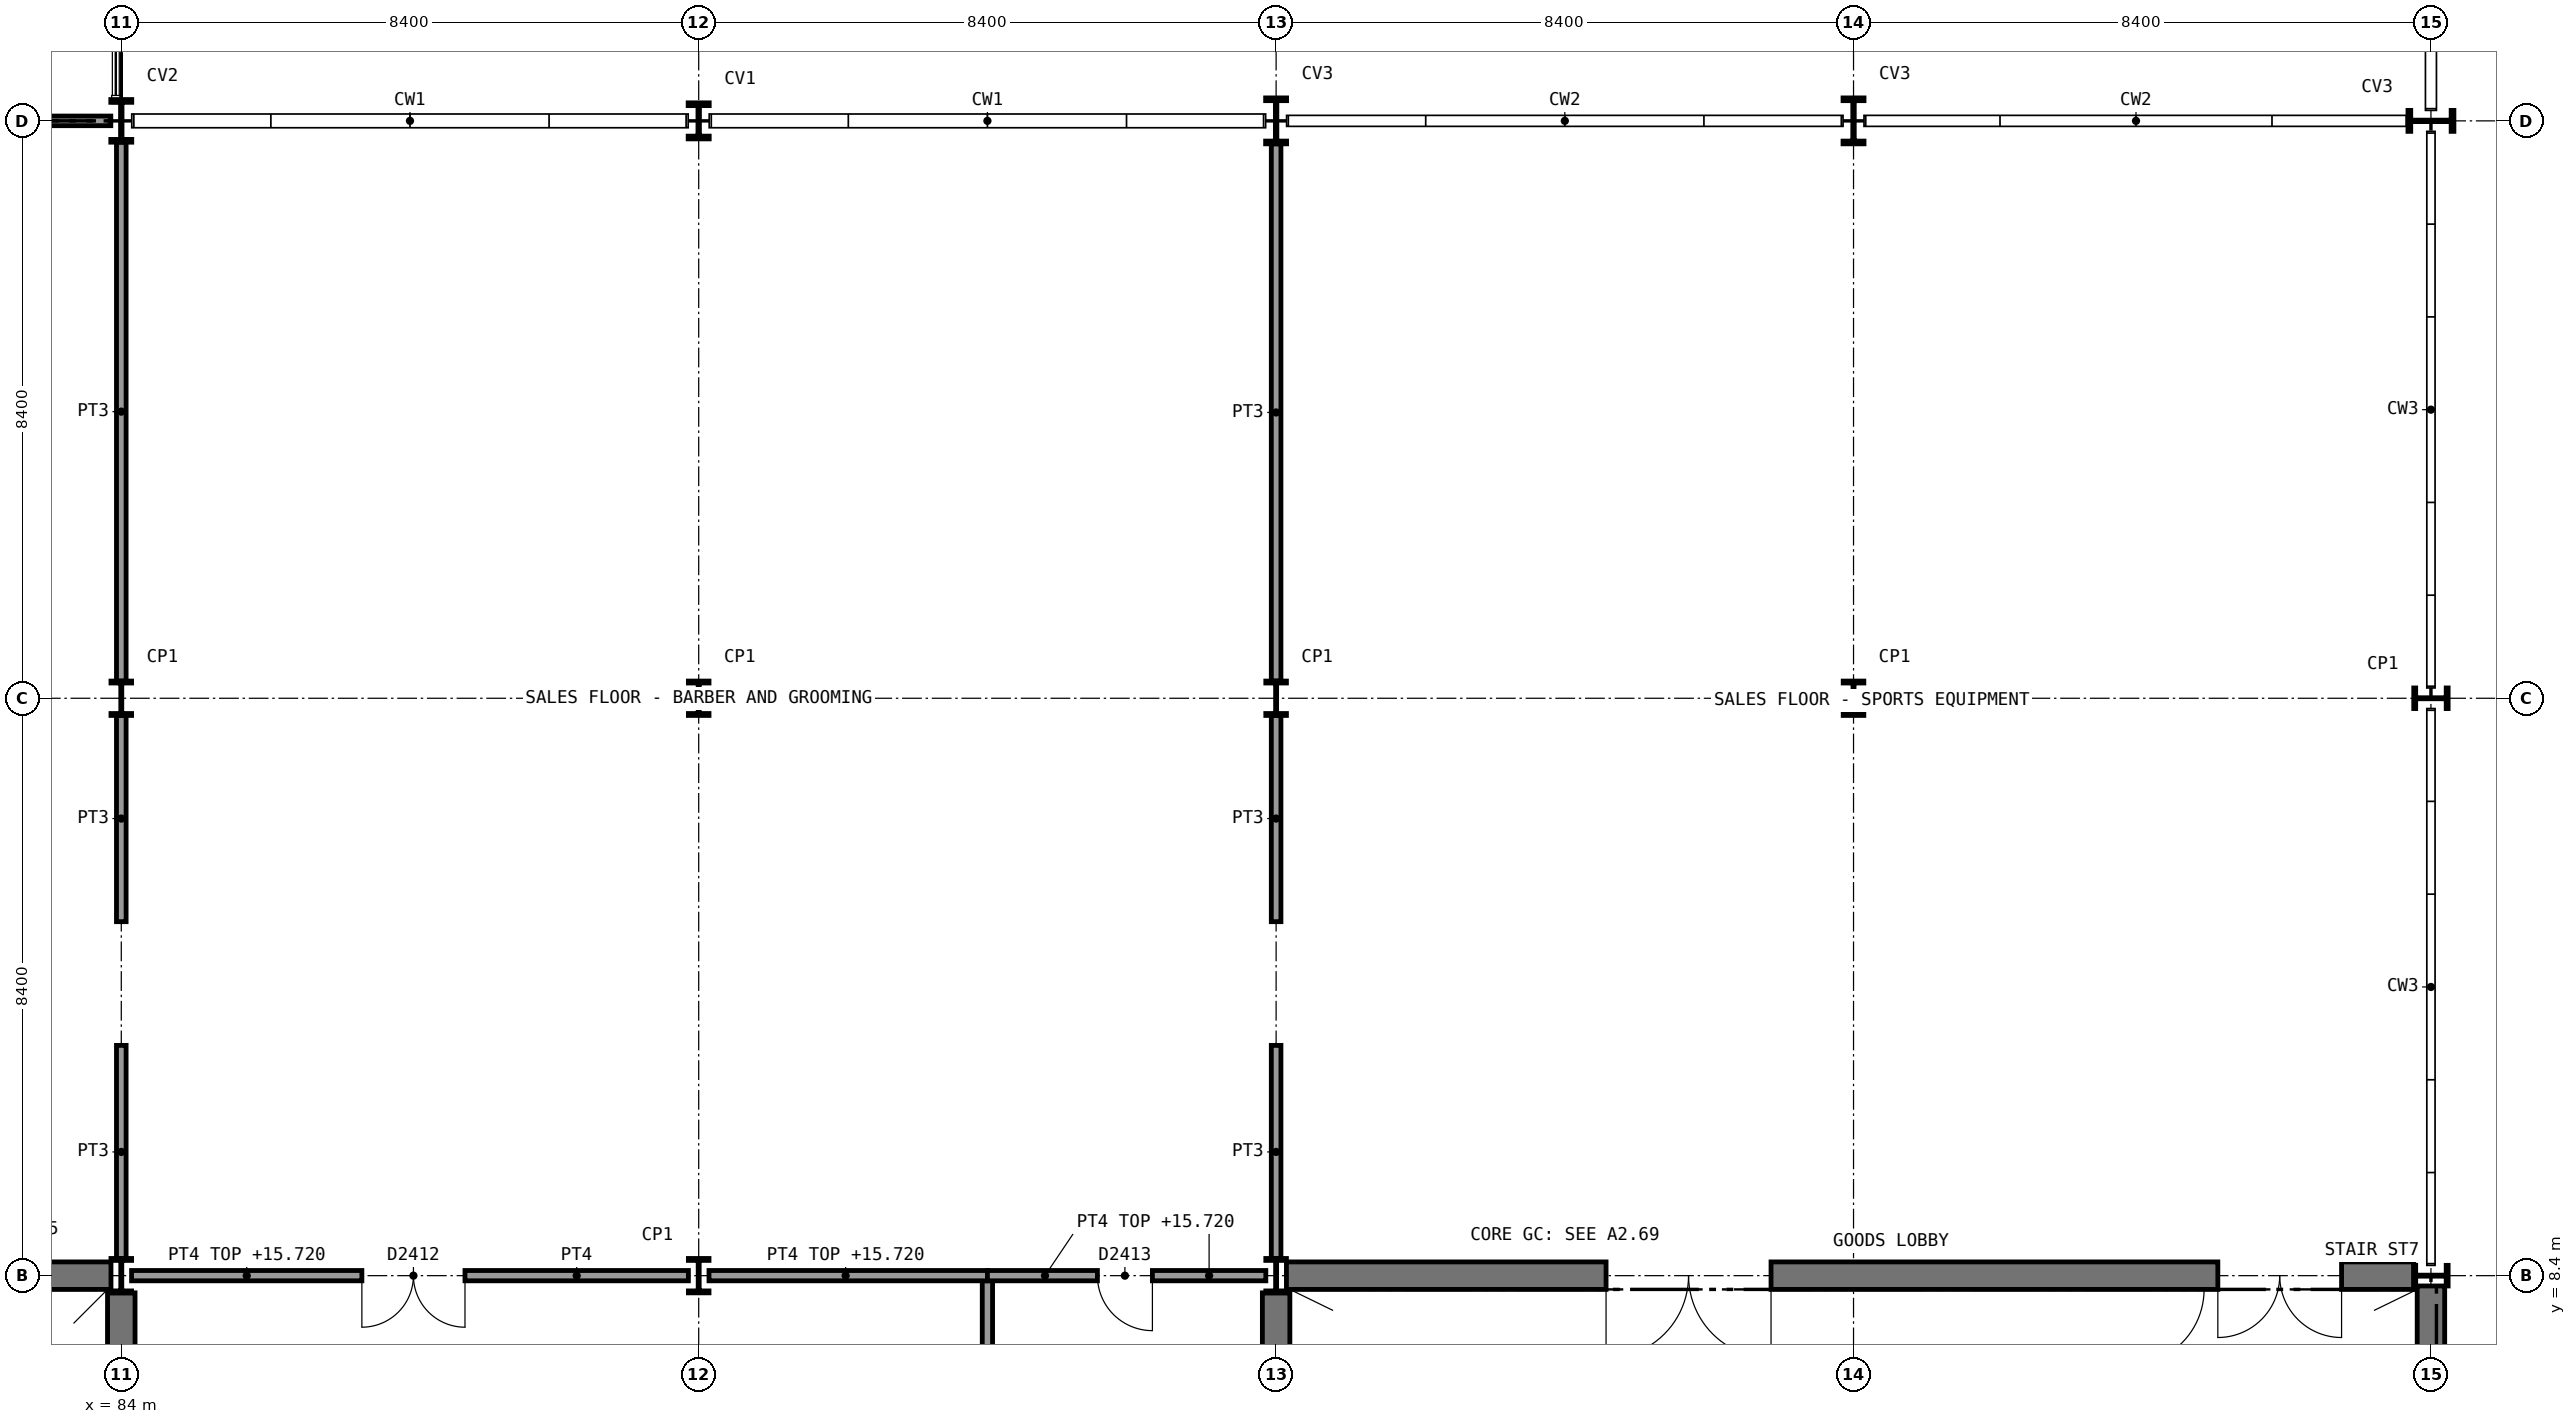
"""IFC4 building model, lengths in metres.
Left out: names, types, materials, properties, quantities, classifications, styles, units other than length and angle.
Written with IfcOpenShell. Run it as: python <this file> out.ifc"""

import sys

from ifc_helpers import new_model, si_unit, direction, frame, frame_2d, origin, origin_2d, place, context, subcontext, project, spatial, rectangle, i_section, extrude, element, fill, save


model = new_model("IFC4")
c1 = context("Model", 3, precision=1e-05, world=origin(), true_north=direction((0.0, 1.0)))
c2 = subcontext(c1, "Body", "Model", "MODEL_VIEW")
j1 = project(units=[si_unit("LENGTHUNIT", "METRE"), si_unit("PLANEANGLEUNIT", "RADIAN")], contexts=[c1])
p1 = place(None, origin())
s1 = spatial("IfcSite", under=j1, at=p1, CompositionType="ELEMENT")
p2 = place(p1, origin())
s2 = spatial("IfcBuilding", under=s1, at=p2, CompositionType="ELEMENT")
p3 = place(p2, frame((0.0, 0.0, 11.4)))
s3 = spatial("IfcBuildingStorey", under=s2, at=p3, CompositionType="ELEMENT", Elevation=11.4)
p4 = place(p3, frame((75.75, 8.4, 0.0), z_axis=(0.0, 0.0, 1.0), x_axis=(1.0, 0.0, 0.0)))
e1 = element("IfcWall", 1, at=p4, inside=s3, PredefinedType="SHEAR", context=c2, shape_type="SweptSolid", body=[
    extrude(rectangle(XDim=8.1, YDim=0.4, at=frame_2d((4.05, 0.0))), origin(), (0.0, 0.0, 1.0), 4.65),
])
p5 = place(p4, frame((1.15, 0.0, 0.0)))
e2 = element("IfcOpeningElement", 2, at=p5, cuts=e1, PredefinedType="OPENING", context=c2, shape_type="SweptSolid", body=[
    extrude(rectangle(XDim=1.8, YDim=2.1, at=frame_2d((0.9, 1.05))), frame((0.0, 0.21, 0.0), z_axis=(0.0, -1.0, 0.0), x_axis=(1.0, 0.0, 0.0)), (0.0, 0.0, 1.0), 0.42),
])
p6 = place(p4, frame((5.3, 0.0, 0.0)))
e3 = element("IfcOpeningElement", 3, at=p6, cuts=e1, PredefinedType="OPENING", context=c2, shape_type="SweptSolid", body=[
    extrude(rectangle(XDim=1.8, YDim=2.1, at=frame_2d((0.9, 1.05))), frame((0.0, 0.21, 0.0), z_axis=(0.0, -1.0, 0.0), x_axis=(1.0, 0.0, 0.0)), (0.0, 0.0, 1.0), 0.42),
])
p7 = place(p3, frame((84.0, 0.25, 0.0), z_axis=(0.0, 0.0, 1.0), x_axis=(0.0, 1.0, 0.0)))
e4 = element("IfcWall", 4, at=p7, inside=s3, PredefinedType="SHEAR", context=c2, shape_type="SweptSolid", body=[
    extrude(rectangle(XDim=7.9, YDim=0.4, at=frame_2d((3.95, 0.0))), origin(), (0.0, 0.0, 1.0), 4.65),
])
p8 = place(p3, frame((100.95, 8.4, 0.0), z_axis=(0.0, 0.0, 1.0), x_axis=(1.0, 0.0, 0.0)))
e5 = element("IfcWall", 5, at=p8, inside=s3, PredefinedType="SHEAR", context=c2, shape_type="SweptSolid", body=[
    extrude(rectangle(XDim=16.4, YDim=0.4, at=frame_2d((8.2, 0.0))), origin(), (0.0, 0.0, 1.0), 4.65),
])
p9 = place(p8, frame((13.55, 0.0, 0.0)))
e6 = element("IfcOpeningElement", 6, at=p9, cuts=e5, PredefinedType="OPENING", context=c2, shape_type="SweptSolid", body=[
    extrude(rectangle(XDim=1.8, YDim=2.1, at=frame_2d((0.9, 1.05))), frame((0.0, 0.21, 0.0), z_axis=(0.0, -1.0, 0.0), x_axis=(1.0, 0.0, 0.0)), (0.0, 0.0, 1.0), 0.42),
])
p10 = place(p8, frame((4.65, 0.0, 0.0)))
e7 = element("IfcOpeningElement", 7, at=p10, cuts=e5, PredefinedType="OPENING", context=c2, shape_type="SweptSolid", body=[
    extrude(rectangle(XDim=2.4, YDim=2.4, at=frame_2d((1.2, 1.2))), frame((0.0, 0.21, 0.0), z_axis=(0.0, -1.0, 0.0), x_axis=(1.0, 0.0, 0.0)), (0.0, 0.0, 1.0), 0.42),
])
p11 = place(p3, frame((100.8, 0.25, 0.0), z_axis=(0.0, 0.0, 1.0), x_axis=(0.0, 1.0, 0.0)))
e8 = element("IfcWall", 8, at=p11, inside=s3, PredefinedType="SHEAR", context=c2, shape_type="SweptSolid", body=[
    extrude(rectangle(XDim=7.9, YDim=0.4, at=frame_2d((3.95, 0.0))), origin(), (0.0, 0.0, 1.0), 4.65),
])
p12 = place(p3, frame((117.6, 0.15, 0.0), z_axis=(0.0, 0.0, 1.0), x_axis=(0.0, 1.0, 0.0)))
e9 = element("IfcWall", 9, at=p12, inside=s3, PredefinedType="SHEAR", context=c2, shape_type="SweptSolid", body=[
    extrude(rectangle(XDim=8.1, YDim=0.4, at=frame_2d((4.05, 0.0))), origin(), (0.0, 0.0, 1.0), 4.65),
])
for number, where, z_axis, x_axis in (
    (10, (84.0, 8.4, 0.0), (0.0, 0.0, 1.0), (1.0, 0.0, 0.0)),
    (11, (84.0, 16.8, 0.0), (0.0, 0.0, 1.0), (1.0, 0.0, 0.0)),
):
    element("IfcColumn", number, at=place(p3, frame(where, z_axis=z_axis, x_axis=x_axis)), inside=s3, PredefinedType="COLUMN", context=c2, shape_type="SweptSolid", body=[
        extrude(i_section(OverallWidth=0.3, OverallDepth=0.5, WebThickness=0.014, FlangeThickness=0.028, FilletRadius=0.027, at=origin_2d()), origin(), (0.0, 0.0, 1.0), 4.8),
    ])
p13 = place(p3, frame((84.0, 25.2, 0.0), z_axis=(0.0, 0.0, 1.0), x_axis=(1.0, 0.0, 0.0)))
e12 = element("IfcColumn", 12, at=p13, inside=s3, PredefinedType="COLUMN", context=c2, shape_type="SweptSolid", body=[
    extrude(i_section(OverallWidth=0.305, OverallDepth=0.62, WebThickness=0.021, FlangeThickness=0.04, FilletRadius=0.027, at=origin_2d()), origin(), (0.0, 0.0, 1.0), 4.8),
])
for number, where, z_axis, x_axis in (
    (13, (92.4, 8.4, 0.0), (0.0, 0.0, 1.0), (1.0, 0.0, 0.0)),
    (14, (92.4, 16.8, 0.0), (0.0, 0.0, 1.0), (1.0, 0.0, 0.0)),
):
    element("IfcColumn", number, at=place(p3, frame(where, z_axis=z_axis, x_axis=x_axis)), inside=s3, PredefinedType="COLUMN", context=c2, shape_type="SweptSolid", body=[
        extrude(i_section(OverallWidth=0.3, OverallDepth=0.5, WebThickness=0.014, FlangeThickness=0.028, FilletRadius=0.027, at=origin_2d()), origin(), (0.0, 0.0, 1.0), 4.8),
    ])
p14 = place(p3, frame((92.4, 25.2, 0.0), z_axis=(0.0, 0.0, 1.0), x_axis=(1.0, 0.0, 0.0)))
e15 = element("IfcColumn", 15, at=p14, inside=s3, PredefinedType="COLUMN", context=c2, shape_type="SweptSolid", body=[
    extrude(i_section(OverallWidth=0.306, OverallDepth=0.524, WebThickness=0.021, FlangeThickness=0.04, FilletRadius=0.027, at=origin_2d()), origin(), (0.0, 0.0, 1.0), 4.8),
])
for number, where, z_axis, x_axis in (
    (16, (100.8, 8.4, 0.0), (0.0, 0.0, 1.0), (1.0, 0.0, 0.0)),
    (17, (100.8, 16.8, 0.0), (0.0, 0.0, 1.0), (1.0, 0.0, 0.0)),
):
    element("IfcColumn", number, at=place(p3, frame(where, z_axis=z_axis, x_axis=x_axis)), inside=s3, PredefinedType="COLUMN", context=c2, shape_type="SweptSolid", body=[
        extrude(i_section(OverallWidth=0.3, OverallDepth=0.5, WebThickness=0.014, FlangeThickness=0.028, FilletRadius=0.027, at=origin_2d()), origin(), (0.0, 0.0, 1.0), 4.8),
    ])
p15 = place(p3, frame((100.8, 25.2, 0.0), z_axis=(0.0, 0.0, 1.0), x_axis=(1.0, 0.0, 0.0)))
e18 = element("IfcColumn", 18, at=p15, inside=s3, PredefinedType="COLUMN", context=c2, shape_type="SweptSolid", body=[
    extrude(i_section(OverallWidth=0.305, OverallDepth=0.668, WebThickness=0.021, FlangeThickness=0.04, FilletRadius=0.027, at=origin_2d()), origin(), (0.0, 0.0, 1.0), 4.8),
])
p16 = place(p3, frame((109.2, 16.8, 0.0), z_axis=(0.0, 0.0, 1.0), x_axis=(1.0, 0.0, 0.0)))
e19 = element("IfcColumn", 19, at=p16, inside=s3, PredefinedType="COLUMN", context=c2, shape_type="SweptSolid", body=[
    extrude(i_section(OverallWidth=0.3, OverallDepth=0.5, WebThickness=0.014, FlangeThickness=0.028, FilletRadius=0.027, at=origin_2d()), origin(), (0.0, 0.0, 1.0), 4.8),
])
p17 = place(p3, frame((109.2, 25.2, 0.0), z_axis=(0.0, 0.0, 1.0), x_axis=(1.0, 0.0, 0.0)))
e20 = element("IfcColumn", 20, at=p17, inside=s3, PredefinedType="COLUMN", context=c2, shape_type="SweptSolid", body=[
    extrude(i_section(OverallWidth=0.305, OverallDepth=0.668, WebThickness=0.021, FlangeThickness=0.04, FilletRadius=0.027, at=origin_2d()), origin(), (0.0, 0.0, 1.0), 4.8),
])
for number, where, z_axis, x_axis in (
    (21, (117.6, 8.4, 0.0), (0.0, 0.0, 1.0), (0.0, 1.0, 0.0)),
    (22, (117.6, 16.8, 0.0), (0.0, 0.0, 1.0), (0.0, 1.0, 0.0)),
):
    element("IfcColumn", number, at=place(p3, frame(where, z_axis=z_axis, x_axis=x_axis)), inside=s3, PredefinedType="COLUMN", context=c2, shape_type="SweptSolid", body=[
        extrude(i_section(OverallWidth=0.3, OverallDepth=0.5, WebThickness=0.014, FlangeThickness=0.028, FilletRadius=0.027, at=origin_2d()), origin(), (0.0, 0.0, 1.0), 4.8),
    ])
p18 = place(p3, frame((117.6, 25.2, 0.0), z_axis=(0.0, 0.0, 1.0), x_axis=(0.0, 1.0, 0.0)))
e23 = element("IfcColumn", 23, at=p18, inside=s3, PredefinedType="COLUMN", context=c2, shape_type="SweptSolid", body=[
    extrude(i_section(OverallWidth=0.305, OverallDepth=0.668, WebThickness=0.021, FlangeThickness=0.04, FilletRadius=0.027, at=origin_2d()), origin(), (0.0, 0.0, 1.0), 4.8),
])
p19 = place(p3, frame((96.6, 0.0, 0.0), z_axis=(0.0, 0.0, 1.0), x_axis=(0.0, 1.0, 0.0)))
e24 = element("IfcWall", 24, at=p19, inside=s3, PredefinedType="SOLIDWALL", context=c2, shape_type="SweptSolid", body=[
    extrude(rectangle(XDim=8.4, YDim=0.15, at=frame_2d((4.2, 0.0))), origin(), (0.0, 0.0, 1.0), 4.65),
])
p20 = place(p3, frame((84.15, 8.4, 0.0), z_axis=(0.0, 0.0, 1.0), x_axis=(1.0, 0.0, 0.0)))
e25 = element("IfcWall", 25, at=p20, inside=s3, PredefinedType="SOLIDWALL", context=c2, shape_type="SweptSolid", body=[
    extrude(rectangle(XDim=8.1, YDim=0.15, at=frame_2d((4.05, 0.0))), origin(), (0.0, 0.0, 1.0), 4.32),
])
p21 = place(p20, frame((3.35, 0.0, 0.0)))
e26 = element("IfcOpeningElement", 26, at=p21, cuts=e25, PredefinedType="OPENING", context=c2, shape_type="SweptSolid", body=[
    extrude(rectangle(XDim=1.5, YDim=2.1, at=frame_2d((0.75, 1.05))), frame((0.0, 0.085, 0.0), z_axis=(0.0, -1.0, 0.0), x_axis=(1.0, 0.0, 0.0)), (0.0, 0.0, 1.0), 0.17),
])
p22 = place(p3, frame((92.55, 8.4, 0.0), z_axis=(0.0, 0.0, 1.0), x_axis=(1.0, 0.0, 0.0)))
e27 = element("IfcWall", 27, at=p22, inside=s3, PredefinedType="SOLIDWALL", context=c2, shape_type="SweptSolid", body=[
    extrude(rectangle(XDim=4.05, YDim=0.15, at=frame_2d((2.025, 0.0))), origin(), (0.0, 0.0, 1.0), 4.32),
])
p23 = place(p3, frame((96.6, 8.4, 0.0), z_axis=(0.0, 0.0, 1.0), x_axis=(1.0, 0.0, 0.0)))
e28 = element("IfcWall", 28, at=p23, inside=s3, PredefinedType="SOLIDWALL", context=c2, shape_type="SweptSolid", body=[
    extrude(rectangle(XDim=4.05, YDim=0.15, at=frame_2d((2.025, 0.0))), origin(), (0.0, 0.0, 1.0), 4.32),
])
p24 = place(p23, frame((1.6, 0.0, 0.0)))
e29 = element("IfcOpeningElement", 29, at=p24, cuts=e28, PredefinedType="OPENING", context=c2, shape_type="SweptSolid", body=[
    extrude(rectangle(XDim=0.8, YDim=2.1, at=frame_2d((0.4, 1.05))), frame((0.0, 0.085, 0.0), z_axis=(0.0, -1.0, 0.0), x_axis=(1.0, 0.0, 0.0)), (0.0, 0.0, 1.0), 0.17),
])
p25 = place(p3, frame((84.0, 8.65, 0.0), z_axis=(0.0, 0.0, 1.0), x_axis=(0.0, 1.0, 0.0)))
e30 = element("IfcWall", 30, at=p25, inside=s3, PredefinedType="PARTITIONING", context=c2, shape_type="SweptSolid", body=[
    extrude(rectangle(XDim=3.1, YDim=0.14, at=frame_2d((1.55, 0.0))), origin(), (0.0, 0.0, 1.0), 4.21),
])
p26 = place(p3, frame((84.0, 13.55, 0.0), z_axis=(0.0, 0.0, 1.0), x_axis=(0.0, 1.0, 0.0)))
e31 = element("IfcWall", 31, at=p26, inside=s3, PredefinedType="PARTITIONING", context=c2, shape_type="SweptSolid", body=[
    extrude(rectangle(XDim=3.0, YDim=0.14, at=frame_2d((1.5, 0.0))), origin(), (0.0, 0.0, 1.0), 4.21),
])
p27 = place(p3, frame((84.0, 17.05, 0.0), z_axis=(0.0, 0.0, 1.0), x_axis=(0.0, 1.0, 0.0)))
e32 = element("IfcWall", 32, at=p27, inside=s3, PredefinedType="PARTITIONING", context=c2, shape_type="SweptSolid", body=[
    extrude(rectangle(XDim=7.84, YDim=0.14, at=frame_2d((3.92, 0.0))), origin(), (0.0, 0.0, 1.0), 4.21),
])
p28 = place(p3, frame((80.653, 25.2, 0.0), z_axis=(0.0, 0.0, 1.0), x_axis=(1.0, 0.0, 0.0)))
e33 = element("IfcWall", 33, at=p28, inside=s3, PredefinedType="PARTITIONING", context=c2, shape_type="SweptSolid", body=[
    extrude(rectangle(XDim=3.195, YDim=0.14, at=frame_2d((1.597, 0.0))), origin(), (0.0, 0.0, 1.0), 4.21),
])
p29 = place(p3, frame((100.8, 8.65, 0.0), z_axis=(0.0, 0.0, 1.0), x_axis=(0.0, 1.0, 0.0)))
e34 = element("IfcWall", 34, at=p29, inside=s3, PredefinedType="PARTITIONING", context=c2, shape_type="SweptSolid", body=[
    extrude(rectangle(XDim=3.1, YDim=0.14, at=frame_2d((1.55, 0.0))), origin(), (0.0, 0.0, 1.0), 4.21),
])
p30 = place(p3, frame((100.8, 13.55, 0.0), z_axis=(0.0, 0.0, 1.0), x_axis=(0.0, 1.0, 0.0)))
e35 = element("IfcWall", 35, at=p30, inside=s3, PredefinedType="PARTITIONING", context=c2, shape_type="SweptSolid", body=[
    extrude(rectangle(XDim=3.0, YDim=0.14, at=frame_2d((1.5, 0.0))), origin(), (0.0, 0.0, 1.0), 4.21),
])
p31 = place(p3, frame((100.8, 17.05, 0.0), z_axis=(0.0, 0.0, 1.0), x_axis=(0.0, 1.0, 0.0)))
e36 = element("IfcWall", 36, at=p31, inside=s3, PredefinedType="PARTITIONING", context=c2, shape_type="SweptSolid", body=[
    extrude(rectangle(XDim=7.816, YDim=0.14, at=frame_2d((3.908, 0.0))), origin(), (0.0, 0.0, 1.0), 4.21),
])
p32 = place(p3, frame((113.2, 0.2, 0.0), z_axis=(0.0, 0.0, 1.0), x_axis=(0.0, 1.0, 0.0)))
e37 = element("IfcWall", 37, at=p32, inside=s3, PredefinedType="SHEAR", context=c2, shape_type="SweptSolid", body=[
    extrude(rectangle(XDim=8.0, YDim=0.2, at=frame_2d((4.0, 0.0))), origin(), (0.0, 0.0, 1.0), 4.65),
])
p33 = place(p32, frame((6.9, 0.0, 0.0)))
e38 = element("IfcOpeningElement", 38, at=p33, cuts=e37, PredefinedType="OPENING", context=c2, shape_type="SweptSolid", body=[
    extrude(rectangle(XDim=1.11, YDim=2.1, at=frame_2d((0.555, 1.05))), frame((0.0, 0.11, 0.0), z_axis=(0.0, -1.0, 0.0), x_axis=(1.0, 0.0, 0.0)), (0.0, 0.0, 1.0), 0.22),
])
p34 = place(p21, frame((1.5, 0.0, 0.0), z_axis=(0.0, 0.0, 1.0), x_axis=(-1.0, 0.0, 0.0)))
e39 = element("IfcDoor", 39, at=p34, inside=s3, OperationType="DOUBLE_DOOR_SINGLE_SWING", PredefinedType="DOOR", context=c2, shape_type="SweptSolid", body=[
    extrude(rectangle(XDim=1.5, YDim=2.1, at=frame_2d((0.75, 1.05))), frame((0.0, 0.025, 0.0), z_axis=(0.0, -1.0, 0.0), x_axis=(1.0, 0.0, 0.0)), (0.0, 0.0, 1.0), 0.05),
])
fill(e26, e39)
p35 = place(p24, frame((0.8, 0.0, 0.0), z_axis=(0.0, 0.0, 1.0), x_axis=(-1.0, 0.0, 0.0)))
e40 = element("IfcDoor", 40, at=p35, inside=s3, OperationType="SINGLE_SWING_LEFT", PredefinedType="DOOR", context=c2, shape_type="SweptSolid", body=[
    extrude(rectangle(XDim=0.8, YDim=2.1, at=frame_2d((0.4, 1.05))), frame((0.0, 0.025, 0.0), z_axis=(0.0, -1.0, 0.0), x_axis=(1.0, 0.0, 0.0)), (0.0, 0.0, 1.0), 0.05),
])
fill(e29, e40)
p36 = place(p33, frame((1.1, 0.0, 0.0), z_axis=(0.0, 0.0, 1.0), x_axis=(-1.0, 0.0, 0.0)))
e41 = element("IfcDoor", 41, at=p36, inside=s3, OperationType="SINGLE_SWING_LEFT", PredefinedType="DOOR", context=c2, shape_type="SweptSolid", body=[
    extrude(rectangle(XDim=1.1, YDim=2.1, at=frame_2d((0.55, 1.05))), frame((0.0, 0.025, 0.0), z_axis=(0.0, -1.0, 0.0), x_axis=(1.0, 0.0, 0.0)), (0.0, 0.0, 1.0), 0.05),
])
fill(e38, e41)
p37 = place(p9, frame((1.8, 0.0, 0.0), z_axis=(0.0, 0.0, 1.0), x_axis=(-1.0, 0.0, 0.0)))
e42 = element("IfcDoor", 42, at=p37, inside=s3, OperationType="DOUBLE_DOOR_SINGLE_SWING", PredefinedType="DOOR", context=c2, shape_type="SweptSolid", body=[
    extrude(rectangle(XDim=1.8, YDim=2.1, at=frame_2d((0.9, 1.05))), frame((0.0, 0.025, 0.0), z_axis=(0.0, -1.0, 0.0), x_axis=(1.0, 0.0, 0.0)), (0.0, 0.0, 1.0), 0.05),
])
fill(e6, e42)
p38 = place(p10, frame((2.4, 0.0, 0.0), z_axis=(0.0, 0.0, 1.0), x_axis=(-1.0, 0.0, 0.0)))
e43 = element("IfcDoor", 43, at=p38, inside=s3, OperationType="DOUBLE_DOOR_SINGLE_SWING", PredefinedType="DOOR", context=c2, shape_type="SweptSolid", body=[
    extrude(rectangle(XDim=2.4, YDim=2.4, at=frame_2d((1.2, 1.2))), frame((0.0, 0.025, 0.0), z_axis=(0.0, -1.0, 0.0), x_axis=(1.0, 0.0, 0.0)), (0.0, 0.0, 1.0), 0.05),
])
fill(e7, e43)
save(model, sys.argv[1])
